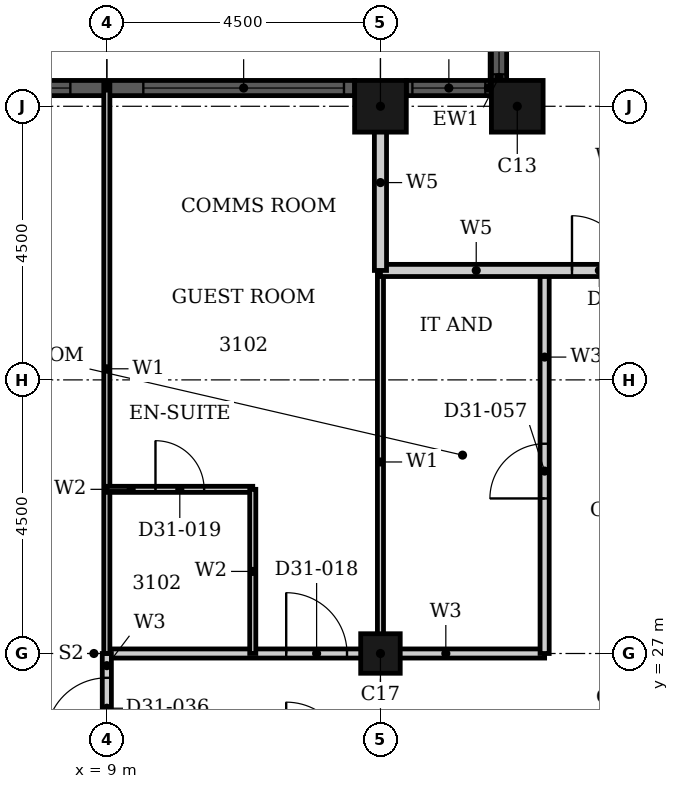
"""IFC4 building model, lengths in metres.
Left out: names, types, materials, properties, quantities, classifications, styles, units other than length and angle.
Written with IfcOpenShell. Run it as: python <this file> out.ifc"""

import sys

from ifc_helpers import new_model, si_unit, direction, frame, frame_2d, origin, origin_2d, place, context, subcontext, project, spatial, rectangle, hollow_rectangle, extrude, element, fill, save


model = new_model("IFC4")
c1 = context("Model", 3, precision=1e-05, world=origin(), true_north=direction((0.0, 1.0)))
c2 = subcontext(c1, "Body", "Model", "MODEL_VIEW")
j1 = project(units=[si_unit("LENGTHUNIT", "METRE"), si_unit("PLANEANGLEUNIT", "RADIAN")], contexts=[c1])
p1 = place(None, origin())
s1 = spatial("IfcSite", under=j1, at=p1, CompositionType="ELEMENT")
p2 = place(p1, origin())
s2 = spatial("IfcBuilding", under=s1, at=p2, CompositionType="ELEMENT")
p3 = place(p2, frame((0.0, 0.0, 126.0)))
s3 = spatial("IfcBuildingStorey", under=s2, at=p3, CompositionType="ELEMENT", Elevation=126.0)
for number, where, z_axis, x_axis in (
    (1, (15.75, 36.0, 0.0), (0.0, 0.0, 1.0), (1.0, 0.0, 0.0)),
    (2, (13.5, 36.0, 0.0), (0.0, 0.0, 1.0), (1.0, 0.0, 0.0)),
):
    element("IfcColumn", number, at=place(p3, frame(where, z_axis=z_axis, x_axis=x_axis)), inside=s3, PredefinedType="COLUMN", context=c2, shape_type="SweptSolid", body=[
        extrude(hollow_rectangle(XDim=0.85, YDim=0.85, WallThickness=0.026, at=origin_2d()), origin(), (0.0, 0.0, 1.0), 3.6),
    ])
p4 = place(p3, frame((13.5, 27.0, 0.0), z_axis=(0.0, 0.0, 1.0), x_axis=(1.0, 0.0, 0.0)))
e3 = element("IfcColumn", 3, at=p4, inside=s3, PredefinedType="COLUMN", context=c2, shape_type="SweptSolid", body=[
    extrude(hollow_rectangle(XDim=0.65, YDim=0.65, WallThickness=0.021, at=origin_2d()), origin(), (0.0, 0.0, 1.0), 3.6),
])
p5 = place(p3, frame((15.45, 37.825, 0.0), z_axis=(0.0, 0.0, 1.0), x_axis=(0.0, -1.0, 0.0)))
e4 = element("IfcWall", 4, at=p5, inside=s3, PredefinedType="SOLIDWALL", context=c2, shape_type="SweptSolid", body=[
    extrude(rectangle(XDim=1.4, YDim=0.25, at=frame_2d((0.7, 0.0))), origin(), (0.0, 0.0, 1.0), 3.6),
])
p6 = place(p5, frame((0.1, 0.0, 0.9)))
e5 = element("IfcOpeningElement", 5, at=p6, cuts=e4, PredefinedType="OPENING", context=c2, shape_type="SweptSolid", body=[
    extrude(rectangle(XDim=1.2, YDim=2.08, at=frame_2d((0.6, 1.04))), frame((0.0, 0.135, 0.0), z_axis=(0.0, -1.0, 0.0), x_axis=(1.0, 0.0, 0.0)), (0.0, 0.0, 1.0), 0.27),
])
p7 = place(p3, frame((15.325, 36.3, 0.0), z_axis=(0.0, 0.0, 1.0), x_axis=(-1.0, 0.0, 0.0)))
e6 = element("IfcWall", 6, at=p7, inside=s3, PredefinedType="SOLIDWALL", context=c2, shape_type="SweptSolid", body=[
    extrude(rectangle(XDim=1.4, YDim=0.25, at=frame_2d((0.7, 0.0))), origin(), (0.0, 0.0, 1.0), 3.6),
])
p8 = place(p7, frame((0.1, 0.0, 0.9)))
e7 = element("IfcOpeningElement", 7, at=p8, cuts=e6, PredefinedType="OPENING", context=c2, shape_type="SweptSolid", body=[
    extrude(rectangle(XDim=1.2, YDim=2.08, at=frame_2d((0.6, 1.04))), frame((0.0, 0.135, 0.0), z_axis=(0.0, -1.0, 0.0), x_axis=(1.0, 0.0, 0.0)), (0.0, 0.0, 1.0), 0.27),
])
p9 = place(p3, frame((13.075, 36.3, 0.0), z_axis=(0.0, 0.0, 1.0), x_axis=(-1.0, 0.0, 0.0)))
e8 = element("IfcWall", 8, at=p9, inside=s3, PredefinedType="SOLIDWALL", context=c2, shape_type="SweptSolid", body=[
    extrude(rectangle(XDim=8.15, YDim=0.25, at=frame_2d((4.075, 0.0))), origin(), (0.0, 0.0, 1.0), 3.6),
])
p10 = place(p9, frame((0.175, 0.0, 0.9)))
e9 = element("IfcOpeningElement", 9, at=p10, cuts=e8, PredefinedType="OPENING", context=c2, shape_type="SweptSolid", body=[
    extrude(rectangle(XDim=3.3, YDim=2.08, at=frame_2d((1.65, 1.04))), frame((0.0, 0.135, 0.0), z_axis=(0.0, -1.0, 0.0), x_axis=(1.0, 0.0, 0.0)), (0.0, 0.0, 1.0), 0.27),
])
p11 = place(p9, frame((4.675, 0.0, 0.9)))
e10 = element("IfcOpeningElement", 10, at=p11, cuts=e8, PredefinedType="OPENING", context=c2, shape_type="SweptSolid", body=[
    extrude(rectangle(XDim=3.3, YDim=2.08, at=frame_2d((1.65, 1.04))), frame((0.0, 0.135, 0.0), z_axis=(0.0, -1.0, 0.0), x_axis=(1.0, 0.0, 0.0)), (0.0, 0.0, 1.0), 0.27),
])
p12 = place(p3, frame((9.0, 27.0, 0.0), z_axis=(0.0, 0.0, 1.0), x_axis=(1.0, 0.0, 0.0)))
e11 = element("IfcWall", 11, at=p12, inside=s3, PredefinedType="PARTITIONING", context=c2, shape_type="SweptSolid", body=[
    extrude(rectangle(XDim=7.2, YDim=0.15, at=frame_2d((3.6, 0.0))), origin(), (0.0, 0.0, 1.0), 2.58),
])
p13 = place(p12, frame((2.95, 0.0, 0.0)))
e12 = element("IfcOpeningElement", 12, at=p13, cuts=e11, PredefinedType="OPENING", context=c2, shape_type="SweptSolid", body=[
    extrude(rectangle(XDim=1.0, YDim=2.1, at=frame_2d((0.5, 1.05))), frame((0.0, 0.085, 0.0), z_axis=(0.0, -1.0, 0.0), x_axis=(1.0, 0.0, 0.0)), (0.0, 0.0, 1.0), 0.17),
])
p14 = place(p3, frame((16.2, 27.0, 0.0), z_axis=(0.0, 0.0, 1.0), x_axis=(0.0, 1.0, 0.0)))
e13 = element("IfcWall", 13, at=p14, inside=s3, PredefinedType="PARTITIONING", context=c2, shape_type="SweptSolid", body=[
    extrude(rectangle(XDim=6.3, YDim=0.15, at=frame_2d((3.15, 0.0))), origin(), (0.0, 0.0, 1.0), 3.3),
])
p15 = place(p14, frame((2.55, 0.0, 0.0)))
e14 = element("IfcOpeningElement", 14, at=p15, cuts=e13, PredefinedType="OPENING", context=c2, shape_type="SweptSolid", body=[
    extrude(rectangle(XDim=0.9, YDim=2.1, at=frame_2d((0.45, 1.05))), frame((0.0, 0.085, 0.0), z_axis=(0.0, -1.0, 0.0), x_axis=(1.0, 0.0, 0.0)), (0.0, 0.0, 1.0), 0.17),
])
p16 = place(p3, frame((9.0, 25.2, 0.0), z_axis=(0.0, 0.0, 1.0), x_axis=(0.0, 1.0, 0.0)))
e15 = element("IfcWall", 15, at=p16, inside=s3, PredefinedType="PARTITIONING", context=c2, shape_type="SweptSolid", body=[
    extrude(rectangle(XDim=1.8, YDim=0.15, at=frame_2d((0.9, 0.0))), origin(), (0.0, 0.0, 1.0), 3.3),
])
p17 = place(p16, frame((0.4, 0.0, 0.0)))
e16 = element("IfcOpeningElement", 16, at=p17, cuts=e15, PredefinedType="OPENING", context=c2, shape_type="SweptSolid", body=[
    extrude(rectangle(XDim=1.0, YDim=2.1, at=frame_2d((0.5, 1.05))), frame((0.0, 0.085, 0.0), z_axis=(0.0, -1.0, 0.0), x_axis=(1.0, 0.0, 0.0)), (0.0, 0.0, 1.0), 0.17),
])
p18 = place(p3, frame((13.5, 27.0, 0.0), z_axis=(0.0, 0.0, 1.0), x_axis=(0.0, 1.0, 0.0)))
e17 = element("IfcWall", 17, at=p18, inside=s3, PredefinedType="PARTITIONING", context=c2, shape_type="SweptSolid", body=[
    extrude(rectangle(XDim=6.3, YDim=0.1, at=frame_2d((3.15, 0.0))), origin(), (0.0, 0.0, 1.0), 2.38),
])
p19 = place(p3, frame((9.0, 27.0, 0.0), z_axis=(0.0, 0.0, 1.0), x_axis=(0.0, 1.0, 0.0)))
e18 = element("IfcWall", 18, at=p19, inside=s3, PredefinedType="PARTITIONING", context=c2, shape_type="SweptSolid", body=[
    extrude(rectangle(XDim=9.365, YDim=0.1, at=frame_2d((4.683, 0.0))), origin(), (0.0, 0.0, 1.0), 3.3),
])
p20 = place(p3, frame((9.0, 29.7, 0.0), z_axis=(0.0, 0.0, 1.0), x_axis=(1.0, 0.0, 0.0)))
e19 = element("IfcWall", 19, at=p20, inside=s3, PredefinedType="PARTITIONING", context=c2, shape_type="SweptSolid", body=[
    extrude(rectangle(XDim=2.4, YDim=0.1, at=frame_2d((1.2, 0.0))), origin(), (0.0, 0.0, 1.0), 3.3),
])
p21 = place(p20, frame((0.8, 0.0, 0.0)))
e20 = element("IfcOpeningElement", 20, at=p21, cuts=e19, PredefinedType="OPENING", context=c2, shape_type="SweptSolid", body=[
    extrude(rectangle(XDim=0.8, YDim=2.1, at=frame_2d((0.4, 1.05))), frame((0.0, 0.06, 0.0), z_axis=(0.0, -1.0, 0.0), x_axis=(1.0, 0.0, 0.0)), (0.0, 0.0, 1.0), 0.12),
])
p22 = place(p3, frame((11.4, 27.0, 0.0), z_axis=(0.0, 0.0, 1.0), x_axis=(0.0, 1.0, 0.0)))
e21 = element("IfcWall", 21, at=p22, inside=s3, PredefinedType="PARTITIONING", context=c2, shape_type="SweptSolid", body=[
    extrude(rectangle(XDim=2.7, YDim=0.1, at=frame_2d((1.35, 0.0))), origin(), (0.0, 0.0, 1.0), 3.3),
])
p23 = place(p3, frame((13.5, 33.3, 0.0), z_axis=(0.0, 0.0, 1.0), x_axis=(1.0, 0.0, 0.0)))
e22 = element("IfcWall", 22, at=p23, inside=s3, PredefinedType="PARTITIONING", context=c2, shape_type="SweptSolid", body=[
    extrude(rectangle(XDim=4.5, YDim=0.2, at=frame_2d((2.25, 0.0))), origin(), (0.0, 0.0, 1.0), 3.3),
])
p24 = place(p23, frame((3.15, 0.0, 0.0)))
e23 = element("IfcOpeningElement", 23, at=p24, cuts=e22, PredefinedType="OPENING", context=c2, shape_type="SweptSolid", body=[
    extrude(rectangle(XDim=0.9, YDim=2.1, at=frame_2d((0.45, 1.05))), frame((0.0, 0.11, 0.0), z_axis=(0.0, -1.0, 0.0), x_axis=(1.0, 0.0, 0.0)), (0.0, 0.0, 1.0), 0.22),
])
p25 = place(p3, frame((13.5, 33.3, 0.0), z_axis=(0.0, 0.0, 1.0), x_axis=(0.0, 1.0, 0.0)))
e24 = element("IfcWall", 24, at=p25, inside=s3, PredefinedType="PARTITIONING", context=c2, shape_type="SweptSolid", body=[
    extrude(rectangle(XDim=2.89, YDim=0.2, at=frame_2d((1.445, 0.0))), origin(), (0.0, 0.0, 1.0), 2.38),
])
p26 = place(p6, origin())
e25 = element("IfcWindow", 25, at=p26, inside=s3, PartitioningType="SINGLE_PANEL", PredefinedType="WINDOW", context=c2, shape_type="SweptSolid", body=[
    extrude(rectangle(XDim=1.2, YDim=2.08, at=frame_2d((0.6, 1.04))), frame((0.0, 0.03, 0.0), z_axis=(0.0, -1.0, 0.0), x_axis=(1.0, 0.0, 0.0)), (0.0, 0.0, 1.0), 0.06),
])
fill(e5, e25)
p27 = place(p8, origin())
e26 = element("IfcWindow", 26, at=p27, inside=s3, PartitioningType="SINGLE_PANEL", PredefinedType="WINDOW", context=c2, shape_type="SweptSolid", body=[
    extrude(rectangle(XDim=1.2, YDim=2.08, at=frame_2d((0.6, 1.04))), frame((0.0, 0.03, 0.0), z_axis=(0.0, -1.0, 0.0), x_axis=(1.0, 0.0, 0.0)), (0.0, 0.0, 1.0), 0.06),
])
fill(e7, e26)
p28 = place(p10, origin())
e27 = element("IfcWindow", 27, at=p28, inside=s3, PartitioningType="SINGLE_PANEL", PredefinedType="WINDOW", context=c2, shape_type="SweptSolid", body=[
    extrude(rectangle(XDim=3.3, YDim=2.08, at=frame_2d((1.65, 1.04))), frame((0.0, 0.03, 0.0), z_axis=(0.0, -1.0, 0.0), x_axis=(1.0, 0.0, 0.0)), (0.0, 0.0, 1.0), 0.06),
])
fill(e9, e27)
p29 = place(p11, origin())
e28 = element("IfcWindow", 28, at=p29, inside=s3, PartitioningType="SINGLE_PANEL", PredefinedType="WINDOW", context=c2, shape_type="SweptSolid", body=[
    extrude(rectangle(XDim=3.3, YDim=2.08, at=frame_2d((1.65, 1.04))), frame((0.0, 0.03, 0.0), z_axis=(0.0, -1.0, 0.0), x_axis=(1.0, 0.0, 0.0)), (0.0, 0.0, 1.0), 0.06),
])
fill(e10, e28)
p30 = place(p13, origin())
e29 = element("IfcDoor", 29, at=p30, inside=s3, OperationType="SINGLE_SWING_RIGHT", PredefinedType="DOOR", context=c2, shape_type="SweptSolid", body=[
    extrude(rectangle(XDim=1.0, YDim=2.1, at=frame_2d((0.5, 1.05))), frame((0.0, 0.025, 0.0), z_axis=(0.0, -1.0, 0.0), x_axis=(1.0, 0.0, 0.0)), (0.0, 0.0, 1.0), 0.05),
])
fill(e12, e29)
p31 = place(p21, origin())
e30 = element("IfcDoor", 30, at=p31, inside=s3, OperationType="SINGLE_SWING_RIGHT", PredefinedType="DOOR", context=c2, shape_type="SweptSolid", body=[
    extrude(rectangle(XDim=0.8, YDim=2.1, at=frame_2d((0.4, 1.05))), frame((0.0, 0.025, 0.0), z_axis=(0.0, -1.0, 0.0), x_axis=(1.0, 0.0, 0.0)), (0.0, 0.0, 1.0), 0.05),
])
fill(e20, e30)
p32 = place(p17, origin())
e31 = element("IfcDoor", 31, at=p32, inside=s3, OperationType="SINGLE_SWING_LEFT", PredefinedType="DOOR", context=c2, shape_type="SweptSolid", body=[
    extrude(rectangle(XDim=1.0, YDim=2.1, at=frame_2d((0.5, 1.05))), frame((0.0, 0.025, 0.0), z_axis=(0.0, -1.0, 0.0), x_axis=(1.0, 0.0, 0.0)), (0.0, 0.0, 1.0), 0.05),
])
fill(e16, e31)
p33 = place(p24, origin())
e32 = element("IfcDoor", 32, at=p33, inside=s3, OperationType="SINGLE_SWING_RIGHT", PredefinedType="DOOR", context=c2, shape_type="SweptSolid", body=[
    extrude(rectangle(XDim=0.9, YDim=2.1, at=frame_2d((0.45, 1.05))), frame((0.0, 0.025, 0.0), z_axis=(0.0, -1.0, 0.0), x_axis=(1.0, 0.0, 0.0)), (0.0, 0.0, 1.0), 0.05),
])
fill(e23, e32)
p34 = place(p15, origin())
e33 = element("IfcDoor", 33, at=p34, inside=s3, OperationType="SINGLE_SWING_LEFT", PredefinedType="DOOR", context=c2, shape_type="SweptSolid", body=[
    extrude(rectangle(XDim=0.9, YDim=2.1, at=frame_2d((0.45, 1.05))), frame((0.0, 0.025, 0.0), z_axis=(0.0, -1.0, 0.0), x_axis=(1.0, 0.0, 0.0)), (0.0, 0.0, 1.0), 0.05),
])
fill(e14, e33)
save(model, sys.argv[1])
